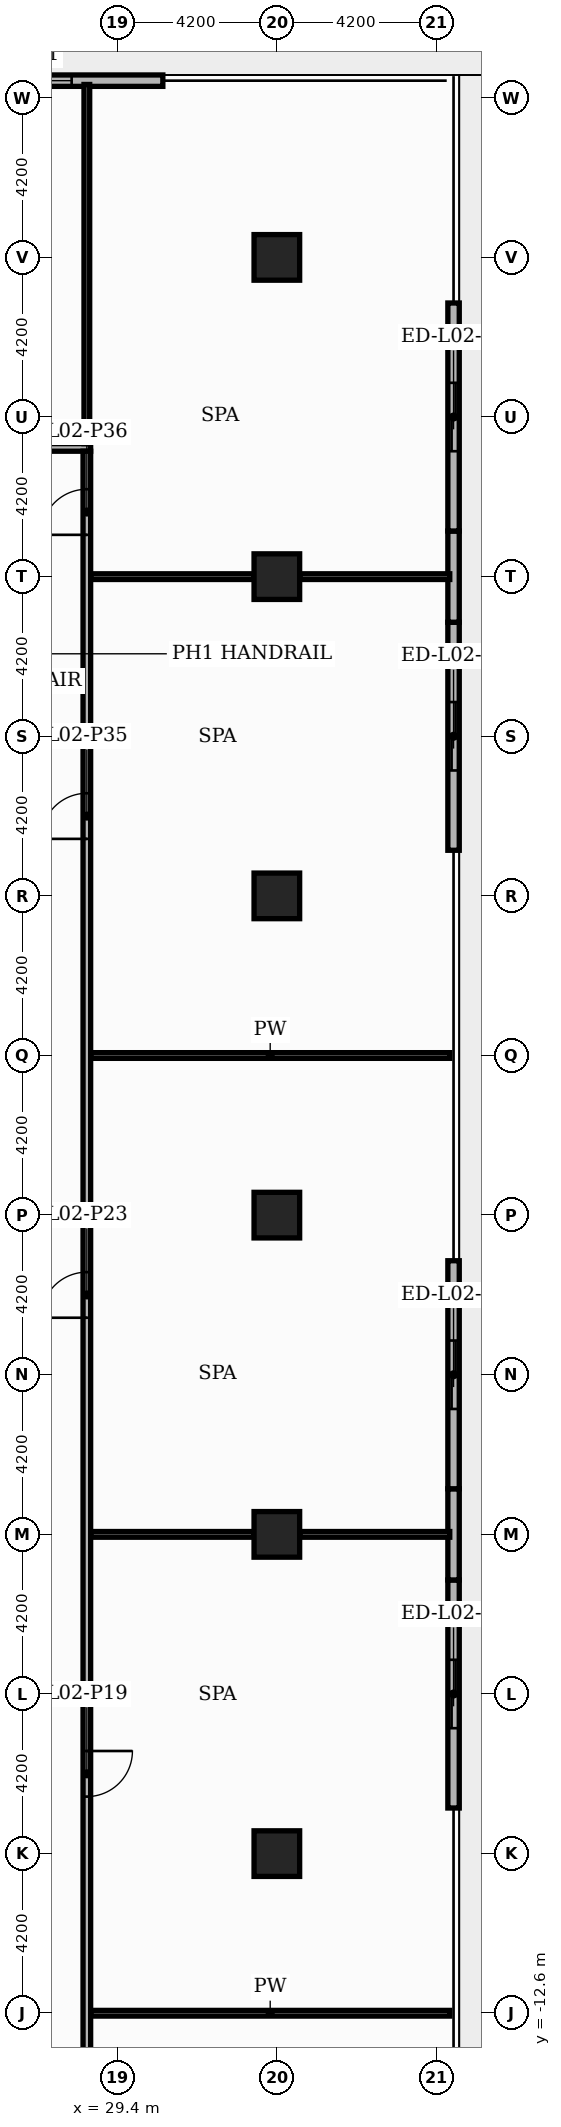
"""IFC4 building model, lengths in metres.
Left out: names, types, materials, properties, quantities, classifications, styles, units other than length and angle.
Written with IfcOpenShell. Run it as: python <this file> out.ifc"""

import sys

from ifc_helpers import new_model, si_unit, direction, frame, frame_2d, origin, origin_2d, place, context, subcontext, project, spatial, rectangle, extrude, element, fill, save


model = new_model("IFC4")
c1 = context("Model", 3, precision=1e-05, world=origin(), true_north=direction((0.0, 1.0)))
c2 = subcontext(c1, "Body", "Model", "MODEL_VIEW")
j1 = project(units=[si_unit("LENGTHUNIT", "METRE"), si_unit("PLANEANGLEUNIT", "RADIAN")], contexts=[c1])
p1 = place(None, origin())
s1 = spatial("IfcSite", under=j1, at=p1, CompositionType="ELEMENT")
p2 = place(p1, origin())
s2 = spatial("IfcBuilding", under=s1, at=p2, CompositionType="ELEMENT")
p3 = place(p2, frame((0.0, 0.0, 12.0)))
s3 = spatial("IfcBuildingStorey", under=s2, at=p3, CompositionType="ELEMENT", Elevation=12.0)
for number, where, z_axis, x_axis in (
    (1, (33.6, 0.0, 0.0), (0.0, 0.0, 1.0), (1.0, 0.0, 0.0)),
    (2, (33.6, 8.4, 0.0), (0.0, 0.0, 1.0), (1.0, 0.0, 0.0)),
    (3, (33.6, 16.8, 0.0), (0.0, 0.0, 1.0), (1.0, 0.0, 0.0)),
    (4, (33.6, 25.2, 0.0), (0.0, 0.0, 1.0), (1.0, 0.0, 0.0)),
    (5, (33.6, 33.6, 0.0), (0.0, 0.0, 1.0), (1.0, 0.0, 0.0)),
    (6, (33.6, -8.4, 0.0), (0.0, 0.0, 1.0), (1.0, 0.0, 0.0)),
):
    element("IfcColumn", number, at=place(p3, frame(where, z_axis=z_axis, x_axis=x_axis)), inside=s3, PredefinedType="COLUMN", context=c2, shape_type="SweptSolid", body=[
        extrude(rectangle(XDim=1.2, YDim=1.2, at=origin_2d()), origin(), (0.0, 0.0, 1.0), 4.8),
    ])
p4 = place(p3, frame((38.25, -7.2, 0.0), z_axis=(0.0, 0.0, 1.0), x_axis=(0.0, 1.0, 0.0)))
e7 = element("IfcWall", 7, at=p4, inside=s3, PredefinedType="STANDARD", context=c2, shape_type="SweptSolid", body=[
    extrude(rectangle(XDim=6.0, YDim=0.3, at=frame_2d((3.0, 0.0))), origin(), (0.0, 0.0, 1.0), 4.38),
])
p5 = place(p4, frame((2.1, 0.0, 0.0)))
e8 = element("IfcOpeningElement", 8, at=p5, cuts=e7, PredefinedType="OPENING", context=c2, shape_type="SweptSolid", body=[
    extrude(rectangle(XDim=1.8, YDim=2.4, at=frame_2d((0.9, 1.2))), frame((0.0, 0.16, 0.0), z_axis=(0.0, -1.0, 0.0), x_axis=(1.0, 0.0, 0.0)), (0.0, 0.0, 1.0), 0.32),
])
p6 = place(p3, frame((38.25, -1.2, 0.0), z_axis=(0.0, 0.0, 1.0), x_axis=(0.0, 1.0, 0.0)))
e9 = element("IfcWall", 9, at=p6, inside=s3, PredefinedType="STANDARD", context=c2, shape_type="SweptSolid", body=[
    extrude(rectangle(XDim=2.4, YDim=0.3, at=frame_2d((1.2, 0.0))), origin(), (0.0, 0.0, 1.0), 4.38),
])
p7 = place(p3, frame((38.25, 1.2, 0.0), z_axis=(0.0, 0.0, 1.0), x_axis=(0.0, 1.0, 0.0)))
e10 = element("IfcWall", 10, at=p7, inside=s3, PredefinedType="STANDARD", context=c2, shape_type="SweptSolid", body=[
    extrude(rectangle(XDim=6.0, YDim=0.3, at=frame_2d((3.0, 0.0))), origin(), (0.0, 0.0, 1.0), 4.38),
])
p8 = place(p7, frame((2.1, 0.0, 0.0)))
e11 = element("IfcOpeningElement", 11, at=p8, cuts=e10, PredefinedType="OPENING", context=c2, shape_type="SweptSolid", body=[
    extrude(rectangle(XDim=1.8, YDim=2.4, at=frame_2d((0.9, 1.2))), frame((0.0, 0.16, 0.0), z_axis=(0.0, -1.0, 0.0), x_axis=(1.0, 0.0, 0.0)), (0.0, 0.0, 1.0), 0.32),
])
p9 = place(p3, frame((38.25, 18.0, 0.0), z_axis=(0.0, 0.0, 1.0), x_axis=(0.0, 1.0, 0.0)))
e12 = element("IfcWall", 12, at=p9, inside=s3, PredefinedType="STANDARD", context=c2, shape_type="SweptSolid", body=[
    extrude(rectangle(XDim=6.0, YDim=0.3, at=frame_2d((3.0, 0.0))), origin(), (0.0, 0.0, 1.0), 4.38),
])
p10 = place(p9, frame((2.1, 0.0, 0.0)))
e13 = element("IfcOpeningElement", 13, at=p10, cuts=e12, PredefinedType="OPENING", context=c2, shape_type="SweptSolid", body=[
    extrude(rectangle(XDim=1.8, YDim=2.4, at=frame_2d((0.9, 1.2))), frame((0.0, 0.16, 0.0), z_axis=(0.0, -1.0, 0.0), x_axis=(1.0, 0.0, 0.0)), (0.0, 0.0, 1.0), 0.32),
])
p11 = place(p3, frame((38.25, 24.0, 0.0), z_axis=(0.0, 0.0, 1.0), x_axis=(0.0, 1.0, 0.0)))
e14 = element("IfcWall", 14, at=p11, inside=s3, PredefinedType="STANDARD", context=c2, shape_type="SweptSolid", body=[
    extrude(rectangle(XDim=2.4, YDim=0.3, at=frame_2d((1.2, 0.0))), origin(), (0.0, 0.0, 1.0), 4.38),
])
p12 = place(p3, frame((38.25, 26.4, 0.0), z_axis=(0.0, 0.0, 1.0), x_axis=(0.0, 1.0, 0.0)))
e15 = element("IfcWall", 15, at=p12, inside=s3, PredefinedType="STANDARD", context=c2, shape_type="SweptSolid", body=[
    extrude(rectangle(XDim=6.0, YDim=0.3, at=frame_2d((3.0, 0.0))), origin(), (0.0, 0.0, 1.0), 4.38),
])
p13 = place(p12, frame((2.1, 0.0, 0.0)))
e16 = element("IfcOpeningElement", 16, at=p13, cuts=e15, PredefinedType="OPENING", context=c2, shape_type="SweptSolid", body=[
    extrude(rectangle(XDim=1.8, YDim=2.4, at=frame_2d((0.9, 1.2))), frame((0.0, 0.16, 0.0), z_axis=(0.0, -1.0, 0.0), x_axis=(1.0, 0.0, 0.0)), (0.0, 0.0, 1.0), 0.32),
])
p14 = place(p3, frame((30.6, 38.25, 0.0), z_axis=(0.0, 0.0, 1.0), x_axis=(-1.0, 0.0, 0.0)))
e17 = element("IfcWall", 17, at=p14, inside=s3, PredefinedType="STANDARD", context=c2, shape_type="SweptSolid", body=[
    extrude(rectangle(XDim=7.5, YDim=0.3, at=frame_2d((3.75, 0.0))), origin(), (0.0, 0.0, 1.0), 4.38),
])
p15 = place(p14, frame((2.4, 0.0, 0.6)))
e18 = element("IfcOpeningElement", 18, at=p15, cuts=e17, PredefinedType="OPENING", context=c2, shape_type="SweptSolid", body=[
    extrude(rectangle(XDim=1.8, YDim=3.0, at=frame_2d((0.9, 1.5))), frame((0.0, 0.16, 0.0), z_axis=(0.0, -1.0, 0.0), x_axis=(1.0, 0.0, 0.0)), (0.0, 0.0, 1.0), 0.32),
])
p16 = place(p14, frame((4.5, 0.0, 0.6)))
e19 = element("IfcOpeningElement", 19, at=p16, cuts=e17, PredefinedType="OPENING", context=c2, shape_type="SweptSolid", body=[
    extrude(rectangle(XDim=1.8, YDim=3.0, at=frame_2d((0.9, 1.5))), frame((0.0, 0.16, 0.0), z_axis=(0.0, -1.0, 0.0), x_axis=(1.0, 0.0, 0.0)), (0.0, 0.0, 1.0), 0.32),
])
p17 = place(p3, frame((28.7, -12.6, 0.0), z_axis=(0.0, 0.0, 1.0), x_axis=(1.0, 0.0, 0.0)))
e20 = element("IfcWall", 20, at=p17, inside=s3, PredefinedType="PARTITIONING", context=c2, shape_type="SweptSolid", body=[
    extrude(rectangle(XDim=9.45, YDim=0.15, at=frame_2d((4.725, 0.0))), origin(), (0.0, 0.0, 1.0), 4.08),
])
p18 = place(p3, frame((28.7, 0.0, 0.0), z_axis=(0.0, 0.0, 1.0), x_axis=(1.0, 0.0, 0.0)))
e21 = element("IfcWall", 21, at=p18, inside=s3, PredefinedType="PARTITIONING", context=c2, shape_type="SweptSolid", body=[
    extrude(rectangle(XDim=4.3, YDim=0.15, at=frame_2d((2.15, 0.0))), origin(), (0.0, 0.0, 1.0), 4.18),
])
p19 = place(p3, frame((34.2, 0.0, 0.0), z_axis=(0.0, 0.0, 1.0), x_axis=(1.0, 0.0, 0.0)))
e22 = element("IfcWall", 22, at=p19, inside=s3, PredefinedType="PARTITIONING", context=c2, shape_type="SweptSolid", body=[
    extrude(rectangle(XDim=3.95, YDim=0.15, at=frame_2d((1.975, 0.0))), origin(), (0.0, 0.0, 1.0), 4.18),
])
p20 = place(p3, frame((28.7, 12.6, 0.0), z_axis=(0.0, 0.0, 1.0), x_axis=(1.0, 0.0, 0.0)))
e23 = element("IfcWall", 23, at=p20, inside=s3, PredefinedType="PARTITIONING", context=c2, shape_type="SweptSolid", body=[
    extrude(rectangle(XDim=9.45, YDim=0.15, at=frame_2d((4.725, 0.0))), origin(), (0.0, 0.0, 1.0), 4.08),
])
p21 = place(p3, frame((28.7, 25.2, 0.0), z_axis=(0.0, 0.0, 1.0), x_axis=(1.0, 0.0, 0.0)))
e24 = element("IfcWall", 24, at=p21, inside=s3, PredefinedType="PARTITIONING", context=c2, shape_type="SweptSolid", body=[
    extrude(rectangle(XDim=4.3, YDim=0.15, at=frame_2d((2.15, 0.0))), origin(), (0.0, 0.0, 1.0), 4.18),
])
p22 = place(p3, frame((34.2, 25.2, 0.0), z_axis=(0.0, 0.0, 1.0), x_axis=(1.0, 0.0, 0.0)))
e25 = element("IfcWall", 25, at=p22, inside=s3, PredefinedType="PARTITIONING", context=c2, shape_type="SweptSolid", body=[
    extrude(rectangle(XDim=3.95, YDim=0.15, at=frame_2d((1.975, 0.0))), origin(), (0.0, 0.0, 1.0), 4.18),
])
p23 = place(p3, frame((-28.7, 28.6, 0.0), z_axis=(0.0, 0.0, 1.0), x_axis=(1.0, 0.0, 0.0)))
e26 = element("IfcWall", 26, at=p23, inside=s3, PredefinedType="PARTITIONING", context=c2, shape_type="SweptSolid", body=[
    extrude(rectangle(XDim=57.4, YDim=0.2, at=frame_2d((28.7, 0.0))), origin(), (0.0, 0.0, 1.0), 4.08),
])
p24 = place(p23, frame((7.5, 0.0, 0.0)))
e27 = element("IfcOpeningElement", 27, at=p24, cuts=e26, PredefinedType="OPENING", context=c2, shape_type="SweptSolid", body=[
    extrude(rectangle(XDim=1.2, YDim=2.2, at=frame_2d((0.6, 1.1))), frame((0.0, 0.11, 0.0), z_axis=(0.0, -1.0, 0.0), x_axis=(1.0, 0.0, 0.0)), (0.0, 0.0, 1.0), 0.22),
])
p25 = place(p23, frame((23.9, 0.0, 0.0)))
e28 = element("IfcOpeningElement", 28, at=p25, cuts=e26, PredefinedType="OPENING", context=c2, shape_type="SweptSolid", body=[
    extrude(rectangle(XDim=1.2, YDim=2.2, at=frame_2d((0.6, 1.1))), frame((0.0, 0.11, 0.0), z_axis=(0.0, -1.0, 0.0), x_axis=(1.0, 0.0, 0.0)), (0.0, 0.0, 1.0), 0.22),
])
p26 = place(p23, frame((44.5, 0.0, 0.0)))
e29 = element("IfcOpeningElement", 29, at=p26, cuts=e26, PredefinedType="OPENING", context=c2, shape_type="SweptSolid", body=[
    extrude(rectangle(XDim=1.2, YDim=2.2, at=frame_2d((0.6, 1.1))), frame((0.0, 0.11, 0.0), z_axis=(0.0, -1.0, 0.0), x_axis=(1.0, 0.0, 0.0)), (0.0, 0.0, 1.0), 0.22),
])
p27 = place(p3, frame((28.6, -28.5, 0.0), z_axis=(0.0, 0.0, 1.0), x_axis=(0.0, 1.0, 0.0)))
e30 = element("IfcWall", 30, at=p27, inside=s3, PredefinedType="PARTITIONING", context=c2, shape_type="SweptSolid", body=[
    extrude(rectangle(XDim=57.0, YDim=0.2, at=frame_2d((28.5, 0.0))), origin(), (0.0, 0.0, 1.0), 4.18),
])
p28 = place(p27, frame((7.3, 0.0, 0.0)))
e31 = element("IfcOpeningElement", 31, at=p28, cuts=e30, PredefinedType="OPENING", context=c2, shape_type="SweptSolid", body=[
    extrude(rectangle(XDim=1.2, YDim=2.2, at=frame_2d((0.6, 1.1))), frame((0.0, 0.11, 0.0), z_axis=(0.0, -1.0, 0.0), x_axis=(1.0, 0.0, 0.0)), (0.0, 0.0, 1.0), 0.22),
])
p29 = place(p27, frame((21.6, 0.0, 0.0)))
e32 = element("IfcOpeningElement", 32, at=p29, cuts=e30, PredefinedType="OPENING", context=c2, shape_type="SweptSolid", body=[
    extrude(rectangle(XDim=1.2, YDim=2.2, at=frame_2d((0.6, 1.1))), frame((0.0, 0.11, 0.0), z_axis=(0.0, -1.0, 0.0), x_axis=(1.0, 0.0, 0.0)), (0.0, 0.0, 1.0), 0.22),
])
p30 = place(p27, frame((34.2, 0.0, 0.0)))
e33 = element("IfcOpeningElement", 33, at=p30, cuts=e30, PredefinedType="OPENING", context=c2, shape_type="SweptSolid", body=[
    extrude(rectangle(XDim=1.2, YDim=2.2, at=frame_2d((0.6, 1.1))), frame((0.0, 0.11, 0.0), z_axis=(0.0, -1.0, 0.0), x_axis=(1.0, 0.0, 0.0)), (0.0, 0.0, 1.0), 0.22),
])
p31 = place(p27, frame((46.8, 0.0, 0.0)))
e34 = element("IfcOpeningElement", 34, at=p31, cuts=e30, PredefinedType="OPENING", context=c2, shape_type="SweptSolid", body=[
    extrude(rectangle(XDim=1.2, YDim=2.2, at=frame_2d((0.6, 1.1))), frame((0.0, 0.11, 0.0), z_axis=(0.0, -1.0, 0.0), x_axis=(1.0, 0.0, 0.0)), (0.0, 0.0, 1.0), 0.22),
])
p32 = place(p27, frame((54.8, 0.0, 0.0)))
e35 = element("IfcOpeningElement", 35, at=p32, cuts=e30, PredefinedType="OPENING", context=c2, shape_type="SweptSolid", body=[
    extrude(rectangle(XDim=1.2, YDim=2.2, at=frame_2d((0.6, 1.1))), frame((0.0, 0.11, 0.0), z_axis=(0.0, -1.0, 0.0), x_axis=(1.0, 0.0, 0.0)), (0.0, 0.0, 1.0), 0.22),
])
p33 = place(p3, frame((28.6, 28.7, 0.0), z_axis=(0.0, 0.0, 1.0), x_axis=(0.0, 1.0, 0.0)))
e36 = element("IfcWall", 36, at=p33, inside=s3, PredefinedType="PARTITIONING", context=c2, shape_type="SweptSolid", body=[
    extrude(rectangle(XDim=9.45, YDim=0.15, at=frame_2d((4.725, 0.0))), origin(), (0.0, 0.0, 1.0), 4.18),
])
p34 = place(p5, origin())
e37 = element("IfcDoor", 37, at=p34, inside=s3, OperationType="SLIDING_TO_LEFT", PredefinedType="DOOR", context=c2, shape_type="SweptSolid", body=[
    extrude(rectangle(XDim=1.8, YDim=2.4, at=frame_2d((0.9, 1.2))), frame((0.0, 0.025, 0.0), z_axis=(0.0, -1.0, 0.0), x_axis=(1.0, 0.0, 0.0)), (0.0, 0.0, 1.0), 0.05),
])
fill(e8, e37)
p35 = place(p8, origin())
e38 = element("IfcDoor", 38, at=p35, inside=s3, OperationType="SLIDING_TO_LEFT", PredefinedType="DOOR", context=c2, shape_type="SweptSolid", body=[
    extrude(rectangle(XDim=1.8, YDim=2.4, at=frame_2d((0.9, 1.2))), frame((0.0, 0.025, 0.0), z_axis=(0.0, -1.0, 0.0), x_axis=(1.0, 0.0, 0.0)), (0.0, 0.0, 1.0), 0.05),
])
fill(e11, e38)
p36 = place(p10, origin())
e39 = element("IfcDoor", 39, at=p36, inside=s3, OperationType="SLIDING_TO_LEFT", PredefinedType="DOOR", context=c2, shape_type="SweptSolid", body=[
    extrude(rectangle(XDim=1.8, YDim=2.4, at=frame_2d((0.9, 1.2))), frame((0.0, 0.025, 0.0), z_axis=(0.0, -1.0, 0.0), x_axis=(1.0, 0.0, 0.0)), (0.0, 0.0, 1.0), 0.05),
])
fill(e13, e39)
p37 = place(p13, origin())
e40 = element("IfcDoor", 40, at=p37, inside=s3, OperationType="SLIDING_TO_LEFT", PredefinedType="DOOR", context=c2, shape_type="SweptSolid", body=[
    extrude(rectangle(XDim=1.8, YDim=2.4, at=frame_2d((0.9, 1.2))), frame((0.0, 0.025, 0.0), z_axis=(0.0, -1.0, 0.0), x_axis=(1.0, 0.0, 0.0)), (0.0, 0.0, 1.0), 0.05),
])
fill(e16, e40)
p38 = place(p15, origin())
e41 = element("IfcWindow", 41, at=p38, inside=s3, PartitioningType="SINGLE_PANEL", PredefinedType="WINDOW", context=c2, shape_type="SweptSolid", body=[
    extrude(rectangle(XDim=1.8, YDim=3.0, at=frame_2d((0.9, 1.5))), frame((0.0, 0.03, 0.0), z_axis=(0.0, -1.0, 0.0), x_axis=(1.0, 0.0, 0.0)), (0.0, 0.0, 1.0), 0.06),
])
fill(e18, e41)
p39 = place(p29, origin())
e42 = element("IfcDoor", 42, at=p39, inside=s3, OperationType="SINGLE_SWING_RIGHT", PredefinedType="DOOR", context=c2, shape_type="SweptSolid", body=[
    extrude(rectangle(XDim=1.2, YDim=2.2, at=frame_2d((0.6, 1.1))), frame((0.0, 0.025, 0.0), z_axis=(0.0, -1.0, 0.0), x_axis=(1.0, 0.0, 0.0)), (0.0, 0.0, 1.0), 0.05),
])
fill(e32, e42)
p40 = place(p30, origin())
e43 = element("IfcDoor", 43, at=p40, inside=s3, OperationType="SINGLE_SWING_LEFT", PredefinedType="DOOR", context=c2, shape_type="SweptSolid", body=[
    extrude(rectangle(XDim=1.2, YDim=2.2, at=frame_2d((0.6, 1.1))), frame((0.0, 0.025, 0.0), z_axis=(0.0, -1.0, 0.0), x_axis=(1.0, 0.0, 0.0)), (0.0, 0.0, 1.0), 0.05),
])
fill(e33, e43)
p41 = place(p31, origin())
e44 = element("IfcDoor", 44, at=p41, inside=s3, OperationType="SINGLE_SWING_LEFT", PredefinedType="DOOR", context=c2, shape_type="SweptSolid", body=[
    extrude(rectangle(XDim=1.2, YDim=2.2, at=frame_2d((0.6, 1.1))), frame((0.0, 0.025, 0.0), z_axis=(0.0, -1.0, 0.0), x_axis=(1.0, 0.0, 0.0)), (0.0, 0.0, 1.0), 0.05),
])
fill(e34, e44)
p42 = place(p32, origin())
e45 = element("IfcDoor", 45, at=p42, inside=s3, OperationType="SINGLE_SWING_LEFT", PredefinedType="DOOR", context=c2, shape_type="SweptSolid", body=[
    extrude(rectangle(XDim=1.2, YDim=2.2, at=frame_2d((0.6, 1.1))), frame((0.0, 0.025, 0.0), z_axis=(0.0, -1.0, 0.0), x_axis=(1.0, 0.0, 0.0)), (0.0, 0.0, 1.0), 0.05),
])
fill(e35, e45)
save(model, sys.argv[1])
